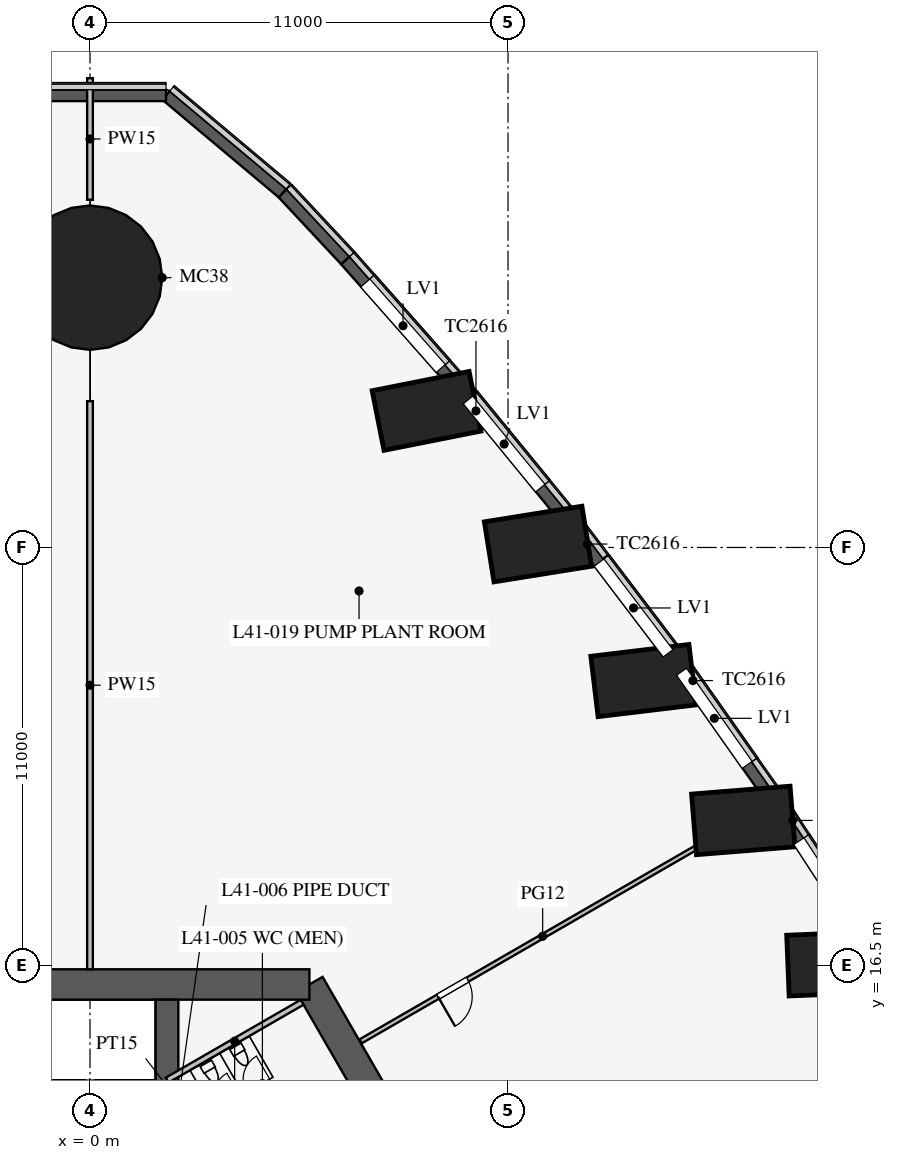
"""IFC4 building model, lengths in metres.
Left out: names, types, materials, properties, quantities, classifications, styles, units other than length and angle.
Written with IfcOpenShell. Run it as: python <this file> out.ifc"""

import sys

from ifc_helpers import new_model, si_unit, direction, frame, frame_2d, origin, origin_2d, place, context, subcontext, project, spatial, polyline, rectangle, circle, outline, extrude, clip, halfspace, element, fill, save


model = new_model("IFC4")
c1 = context("Model", 3, precision=1e-05, world=origin(), true_north=direction((0.0, 1.0)))
c2 = subcontext(c1, "Body", "Model", "MODEL_VIEW")
j1 = project(units=[si_unit("LENGTHUNIT", "METRE"), si_unit("PLANEANGLEUNIT", "RADIAN")], contexts=[c1])
p1 = place(None, origin())
s1 = spatial("IfcSite", under=j1, at=p1, CompositionType="ELEMENT")
p2 = place(p1, origin())
s2 = spatial("IfcBuilding", under=s1, at=p2, CompositionType="ELEMENT")
p3 = place(p2, frame((0.0, 0.0, 178.7)))
s3 = spatial("IfcBuildingStorey", under=s2, at=p3, CompositionType="ELEMENT", Elevation=178.7)
p4 = place(p3, frame((19.893, 16.681, 0.0), z_axis=(-0.186289343802, -0.107569380049, 0.976588505391), x_axis=(-0.533517685828, 0.845745042504, -0.008614057662)))
e1 = element("IfcColumn", 1, at=p4, inside=s3, PredefinedType="COLUMN", context=c2, shape_type="Clipping", body=[
    clip(clip(extrude(rectangle(XDim=2.6, YDim=1.6, at=origin_2d()), origin(), (0.0, 0.0, 1.0), 6.144), halfspace(frame((0.0, 0.0, 0.188), z_axis=(1.3253644547951e-05, 2.4571096812753272e-06, 0.9999999999091518), x_axis=(0.0, 0.9999999999969813, -2.457109681491134e-06)), True)), halfspace(frame((0.0, 0.0, 5.955), z_axis=(-1.3253644547951e-05, -2.4571096812753272e-06, -0.9999999999091518), x_axis=(0.0, -0.9999999999969813, 2.457109681491134e-06)), True)),
])
p5 = place(p3, frame((17.43, 20.456, 0.0), z_axis=(-0.195428167391, -0.112817153021, 0.974207432416), x_axis=(-0.565774582808, 0.824362784845, -0.018031095686)))
e2 = element("IfcColumn", 2, at=p5, inside=s3, PredefinedType="COLUMN", context=c2, shape_type="Clipping", body=[
    clip(clip(extrude(rectangle(XDim=2.6, YDim=1.6, at=origin_2d()), origin(), (0.0, 0.0, 1.0), 6.159), halfspace(frame((0.0, 0.0, 0.21), z_axis=(-1.0393805708591025e-05, 1.5065167287081627e-05, 0.9999999998325048), x_axis=(0.0, 0.9999999998865204, -1.5065167287895381e-05)), True)), halfspace(frame((0.0, 0.0, 5.949), z_axis=(1.0393805708591025e-05, -1.5065167287081627e-05, -0.9999999998325048), x_axis=(0.0, -0.9999999998865204, 1.5065167287895381e-05)), True)),
])
p6 = place(p3, frame((14.825, 24.148, 0.0), z_axis=(-0.21067852764, -0.121639419668, 0.969957942168), x_axis=(-0.596714603171, 0.801927852563, -0.029041378179)))
e3 = element("IfcColumn", 3, at=p6, inside=s3, PredefinedType="COLUMN", context=c2, shape_type="Clipping", body=[
    clip(clip(extrude(rectangle(XDim=2.6, YDim=1.6, at=origin_2d()), origin(), (0.0, 0.0, 1.0), 6.186), halfspace(frame((0.0, 0.0, 0.239), z_axis=(1.2329942088509793e-06, -1.9590941299552078e-05, 0.9999999998073374), x_axis=(0.0, 0.9999999998080975, 1.959094129956697e-05)), True)), halfspace(frame((0.0, 0.0, 5.947), z_axis=(-1.2329942088509793e-06, 1.9590941299552078e-05, -0.9999999998073374), x_axis=(0.0, -0.9999999998080975, -1.959094129956697e-05)), True)),
])
p7 = place(p3, frame((12.077, 27.757, 0.0), z_axis=(-0.231966146532, -0.13391860006, 0.963461216355), x_axis=(-0.625685218316, 0.778923924192, -0.042373669911)))
e4 = element("IfcColumn", 4, at=p7, inside=s3, PredefinedType="COLUMN", context=c2, shape_type="Clipping", body=[
    clip(clip(extrude(rectangle(XDim=2.6, YDim=1.6, at=origin_2d()), origin(), (0.0, 0.0, 1.0), 6.228), halfspace(frame((0.0, 0.0, 0.278), z_axis=(-5.254736092627499e-06, 6.1632004548783925e-06, 0.9999999999672015), x_axis=(0.0, 0.9999999999810075, -6.163200454963482e-06)), True)), halfspace(frame((0.0, 0.0, 5.95), z_axis=(5.254736092627499e-06, -6.1632004548783925e-06, -0.9999999999672015), x_axis=(0.0, -0.9999999999810075, 6.163200454963482e-06)), True)),
])
p8 = place(p3, frame((9.182, 31.282, 0.0), z_axis=(-0.259194268696, -0.149669548506, 0.954157931018), x_axis=(-0.651400622005, 0.756491765533, -0.058287548681)))
e5 = element("IfcColumn", 5, at=p8, inside=s3, PredefinedType="COLUMN", context=c2, shape_type="Clipping", body=[
    clip(clip(extrude(rectangle(XDim=2.6, YDim=1.6, at=origin_2d()), origin(), (0.0, 0.0, 1.0), 6.288), halfspace(frame((0.0, 0.0, 0.327), z_axis=(1.865964990373226e-05, -1.1263139130357482e-05, 0.9999999997624797), x_axis=(0.0, 0.9999999999365708, 1.1263139132318295e-05)), True)), halfspace(frame((0.0, 0.0, 5.962), z_axis=(-1.865964990373226e-05, 1.1263139130357482e-05, -0.9999999997624797), x_axis=(0.0, -0.9999999999365708, -1.1263139132318295e-05)), True)),
])
p9 = place(p3, frame((0.0, 35.0, 0.0), z_axis=(0.0, -0.316227766017, 0.948683298051), x_axis=(1.0, 0.0, 0.0)))
e6 = element("IfcColumn", 6, at=p9, inside=s3, PredefinedType="COLUMN", context=c2, shape_type="Clipping", body=[
    clip(clip(extrude(circle(Radius=1.9, at=origin_2d()), origin(), (0.0, 0.0, 1.0), 6.324), halfspace(frame((0.0, 0.0, 0.634), z_axis=(0.0, 0.0, 1.0), x_axis=(0.0, 1.0, 0.0)), True)), halfspace(frame((0.0, 0.0, 5.69), z_axis=(0.0, 0.0, -1.0), x_axis=(0.0, -1.0, 0.0)), True)),
])
p10 = place(p3, frame((16.743, -3.0, 0.0), z_axis=(0.0, 0.0, 1.0), x_axis=(-0.500002442456, 0.866023993627, 0.0)))
e7 = element("IfcWall", 7, at=p10, inside=s3, PredefinedType="SHEAR", context=c2, shape_type="SweptSolid", body=[
    extrude(rectangle(XDim=21.939, YDim=0.8, at=frame_2d((10.97, 0.0))), origin(), (0.0, 0.0, 1.0), 6.0),
])
p11 = place(p10, frame((17.27, 0.0, 0.0)))
e8 = element("IfcOpeningElement", 8, at=p11, cuts=e7, PredefinedType="OPENING", context=c2, shape_type="SweptSolid", body=[
    extrude(rectangle(XDim=1.2, YDim=2.1, at=frame_2d((0.6, 1.05))), frame((0.0, 0.41, 0.0), z_axis=(0.0, -1.0, 0.0), x_axis=(1.0, 0.0, 0.0)), (0.0, 0.0, 1.0), 0.82),
])
p12 = place(p10, frame((3.47, 0.0, 0.0)))
e9 = element("IfcOpeningElement", 9, at=p12, cuts=e7, PredefinedType="OPENING", context=c2, shape_type="SweptSolid", body=[
    extrude(rectangle(XDim=1.2, YDim=2.1, at=frame_2d((0.6, 1.05))), frame((0.0, 0.41, 0.0), z_axis=(0.0, -1.0, 0.0), x_axis=(1.0, 0.0, 0.0)), (0.0, 0.0, 1.0), 0.82),
])
p13 = place(p3, frame((5.773, 16.0, 0.0), z_axis=(0.0, 0.0, 1.0), x_axis=(-1.0, 0.0, 0.0)))
e10 = element("IfcWall", 10, at=p13, inside=s3, PredefinedType="SHEAR", context=c2, shape_type="SweptSolid", body=[
    extrude(rectangle(XDim=11.547, YDim=0.8, at=frame_2d((5.773, 0.0))), origin(), (0.0, 0.0, 1.0), 6.0),
])
p14 = place(p3, frame((2.025, 6.525, 0.0), z_axis=(0.0, 0.0, 1.0), x_axis=(0.0, 1.0, 0.0)))
e11 = element("IfcWall", 11, at=p14, inside=s3, PredefinedType="SHEAR", context=c2, shape_type="SweptSolid", body=[
    extrude(rectangle(XDim=9.075, YDim=0.6, at=frame_2d((4.538, 0.0))), origin(), (0.0, 0.0, 1.0), 6.0),
])
p15 = place(p3, frame((20.456, 17.006, 0.0), z_axis=(0.0, 0.0, 1.0), x_axis=(-0.546107481908, 0.83771511757, 0.0)))
e12 = element("IfcWall", 12, at=p15, inside=s3, PredefinedType="SOLIDWALL", context=c2, shape_type="SweptSolid", body=[
    extrude(rectangle(XDim=4.507, YDim=0.3, at=frame_2d((2.253, 0.0))), origin(), (0.0, 0.0, 1.0), 5.8),
])
p16 = place(p15, frame((0.3, 0.0, 3.5)))
e13 = element("IfcOpeningElement", 13, at=p16, cuts=e12, PredefinedType="OPENING", context=c2, shape_type="SweptSolid", body=[
    extrude(rectangle(XDim=3.0, YDim=2.0, at=frame_2d((1.5, 1.0))), frame((0.0, 0.16, 0.0), z_axis=(0.0, -1.0, 0.0), x_axis=(1.0, 0.0, 0.0)), (0.0, 0.0, 1.0), 0.32),
])
p17 = place(p3, frame((17.995, 20.782, 0.0), z_axis=(0.0, 0.0, 1.0), x_axis=(-0.575987178736, 0.817458726745, 0.0)))
e14 = element("IfcWall", 14, at=p17, inside=s3, PredefinedType="SOLIDWALL", context=c2, shape_type="SweptSolid", body=[
    extrude(rectangle(XDim=4.518, YDim=0.3, at=frame_2d((2.259, 0.0))), origin(), (0.0, 0.0, 1.0), 5.8),
])
p18 = place(p17, frame((1.218, 0.0, 3.5)))
e15 = element("IfcOpeningElement", 15, at=p18, cuts=e14, PredefinedType="OPENING", context=c2, shape_type="SweptSolid", body=[
    extrude(rectangle(XDim=3.0, YDim=2.0, at=frame_2d((1.5, 1.0))), frame((0.0, 0.16, 0.0), z_axis=(0.0, -1.0, 0.0), x_axis=(1.0, 0.0, 0.0)), (0.0, 0.0, 1.0), 0.32),
])
p19 = place(p3, frame((15.392, 24.475, 0.0), z_axis=(0.0, 0.0, 1.0), x_axis=(-0.605274299339, 0.796016973789, 0.0)))
e16 = element("IfcWall", 16, at=p19, inside=s3, PredefinedType="SOLIDWALL", context=c2, shape_type="SweptSolid", body=[
    extrude(rectangle(XDim=4.536, YDim=0.3, at=frame_2d((2.268, 0.0))), origin(), (0.0, 0.0, 1.0), 5.8),
])
p20 = place(p19, frame((0.3, 0.0, 3.5)))
e17 = element("IfcOpeningElement", 17, at=p20, cuts=e16, PredefinedType="OPENING", context=c2, shape_type="SweptSolid", body=[
    extrude(rectangle(XDim=3.0, YDim=2.0, at=frame_2d((1.5, 1.0))), frame((0.0, 0.16, 0.0), z_axis=(0.0, -1.0, 0.0), x_axis=(1.0, 0.0, 0.0)), (0.0, 0.0, 1.0), 0.32),
])
p21 = place(p3, frame((12.647, 28.086, 0.0), z_axis=(0.0, 0.0, 1.0), x_axis=(-0.633811934582, 0.773487189022, 0.0)))
e18 = element("IfcWall", 18, at=p21, inside=s3, PredefinedType="SOLIDWALL", context=c2, shape_type="SweptSolid", body=[
    extrude(rectangle(XDim=4.56, YDim=0.3, at=frame_2d((2.28, 0.0))), origin(), (0.0, 0.0, 1.0), 5.8),
])
p22 = place(p21, frame((1.26, 0.0, 3.5)))
e19 = element("IfcOpeningElement", 19, at=p22, cuts=e18, PredefinedType="OPENING", context=c2, shape_type="SweptSolid", body=[
    extrude(rectangle(XDim=3.0, YDim=2.0, at=frame_2d((1.5, 1.0))), frame((0.0, 0.16, 0.0), z_axis=(0.0, -1.0, 0.0), x_axis=(1.0, 0.0, 0.0)), (0.0, 0.0, 1.0), 0.32),
])
p23 = place(p3, frame((9.756, 31.614, 0.0), z_axis=(0.0, 0.0, 1.0), x_axis=(-0.66176232182, 0.7497136983, 0.0)))
e20 = element("IfcWall", 20, at=p23, inside=s3, PredefinedType="SOLIDWALL", context=c2, shape_type="SweptSolid", body=[
    extrude(rectangle(XDim=4.591, YDim=0.3, at=frame_2d((2.296, 0.0))), origin(), (0.0, 0.0, 1.0), 5.8),
])
p24 = place(p23, frame((0.796, 0.0, 3.5)))
e21 = element("IfcOpeningElement", 21, at=p24, cuts=e20, PredefinedType="OPENING", context=c2, shape_type="SweptSolid", body=[
    extrude(rectangle(XDim=3.0, YDim=2.0, at=frame_2d((1.5, 1.0))), frame((0.0, 0.16, 0.0), z_axis=(0.0, -1.0, 0.0), x_axis=(1.0, 0.0, 0.0)), (0.0, 0.0, 1.0), 0.32),
])
p25 = place(p3, frame((6.718, 35.056, 0.0), z_axis=(0.0, 0.0, 1.0), x_axis=(-0.682533872246, 0.730853961635, 0.0)))
e22 = element("IfcWall", 22, at=p25, inside=s3, PredefinedType="SOLIDWALL", context=c2, shape_type="SweptSolid", body=[
    extrude(rectangle(XDim=2.42, YDim=0.3, at=frame_2d((1.21, 0.0))), origin(), (0.0, 0.0, 1.0), 5.8),
])
for number, where, z_axis, x_axis in (
    (23, (5.066, 36.824, 0.0), (0.0, 0.0, 1.0), (-0.766, 0.643, 0.0)),
    (24, (2.001, 39.396, 0.0), (0.0, 0.0, 1.0), (-1.0, 0.0, 0.0)),
):
    element("IfcWall", number, at=place(p3, frame(where, z_axis=z_axis, x_axis=x_axis)), inside=s3, PredefinedType="SOLIDWALL", context=c2, shape_type="SweptSolid", body=[
        extrude(rectangle(XDim=4.001, YDim=0.3, at=frame_2d((2.001, 0.0))), origin(), (0.0, 0.0, 1.0), 5.8),
    ])
p26 = place(p3, frame((2.031, 13.482, 0.0), z_axis=(0.0, 0.0, 1.0), x_axis=(0.866050731258, 0.499956128963, 0.0)))
e25 = element("IfcWall", 25, at=p26, inside=s3, PredefinedType="PARTITIONING", context=c2, shape_type="SweptSolid", body=[
    extrude(rectangle(XDim=4.1, YDim=0.15, at=frame_2d((2.05, 0.0))), origin(), (0.0, 0.0, 1.0), 5.8),
])
p27 = place(p3, frame((0.0, 16.4, 0.0), z_axis=(0.0, 0.0, 1.0), x_axis=(0.0, 1.0, 0.0)))
e26 = element("IfcWall", 26, at=p27, inside=s3, PredefinedType="PARTITIONING", context=c2, shape_type="SweptSolid", body=[
    extrude(rectangle(XDim=14.95, YDim=0.15, at=frame_2d((7.475, 0.0))), origin(), (0.0, 0.0, 1.0), 4.2),
])
p28 = place(p3, frame((0.0, 36.65, 0.0), z_axis=(0.0, 0.0, 1.0), x_axis=(0.0, 1.0, 0.0)))
e27 = element("IfcWall", 27, at=p28, inside=s3, PredefinedType="PARTITIONING", context=c2, shape_type="SweptSolid", body=[
    extrude(rectangle(XDim=3.199, YDim=0.15, at=frame_2d((1.6, 0.0))), origin(), (0.0, 0.0, 1.0), 5.8),
])
p29 = place(p3, frame((16.122, 19.7, 0.0), z_axis=(0.0, 0.0, 1.0), x_axis=(0.866002566612, 0.500039553057, 0.0)))
e28 = element("IfcWall", 28, at=p29, inside=s3, PredefinedType="PARTITIONING", context=c2, shape_type="SweptSolid", body=[
    extrude(outline(polyline([(0.0, 0.0), (0.667, 0.0), (0.667, 0.05), (0.0, 2.9), (0.0, 0.0)])), frame((0.0, 0.06, 0.0), z_axis=(0.0, -1.0, 0.0), x_axis=(1.0, 0.0, 0.0)), (0.0, 0.0, 1.0), 0.12),
])
p30 = place(p3, frame((7.122, 14.504, 0.0), z_axis=(0.0, 0.0, 1.0), x_axis=(0.866025583565, 0.49999968861, 0.0)))
e29 = element("IfcWall", 29, at=p30, inside=s3, PredefinedType="PARTITIONING", context=c2, shape_type="SweptSolid", body=[
    extrude(rectangle(XDim=10.393, YDim=0.12, at=frame_2d((5.196, 0.0))), origin(), (0.0, 0.0, 1.0), 2.9),
])
p31 = place(p30, frame((2.35, 0.0, 0.0)))
e30 = element("IfcOpeningElement", 30, at=p31, cuts=e29, PredefinedType="OPENING", context=c2, shape_type="SweptSolid", body=[
    extrude(rectangle(XDim=0.9, YDim=2.1, at=frame_2d((0.45, 1.05))), frame((0.0, 0.07, 0.0), z_axis=(0.0, -1.0, 0.0), x_axis=(1.0, 0.0, 0.0)), (0.0, 0.0, 1.0), 0.14),
])
p32 = place(p16, origin())
e31 = element("IfcWindow", 31, at=p32, inside=s3, PartitioningType="SINGLE_PANEL", PredefinedType="USERDEFINED", context=c2, shape_type="SweptSolid", body=[
    extrude(rectangle(XDim=3.0, YDim=2.0, at=frame_2d((1.5, 1.0))), frame((0.0, 0.03, 0.0), z_axis=(0.0, -1.0, 0.0), x_axis=(1.0, 0.0, 0.0)), (0.0, 0.0, 1.0), 0.06),
])
fill(e13, e31)
p33 = place(p18, origin())
e32 = element("IfcWindow", 32, at=p33, inside=s3, PartitioningType="SINGLE_PANEL", PredefinedType="USERDEFINED", context=c2, shape_type="SweptSolid", body=[
    extrude(rectangle(XDim=3.0, YDim=2.0, at=frame_2d((1.5, 1.0))), frame((0.0, 0.03, 0.0), z_axis=(0.0, -1.0, 0.0), x_axis=(1.0, 0.0, 0.0)), (0.0, 0.0, 1.0), 0.06),
])
fill(e15, e32)
p34 = place(p20, origin())
e33 = element("IfcWindow", 33, at=p34, inside=s3, PartitioningType="SINGLE_PANEL", PredefinedType="USERDEFINED", context=c2, shape_type="SweptSolid", body=[
    extrude(rectangle(XDim=3.0, YDim=2.0, at=frame_2d((1.5, 1.0))), frame((0.0, 0.03, 0.0), z_axis=(0.0, -1.0, 0.0), x_axis=(1.0, 0.0, 0.0)), (0.0, 0.0, 1.0), 0.06),
])
fill(e17, e33)
p35 = place(p22, origin())
e34 = element("IfcWindow", 34, at=p35, inside=s3, PartitioningType="SINGLE_PANEL", PredefinedType="USERDEFINED", context=c2, shape_type="SweptSolid", body=[
    extrude(rectangle(XDim=3.0, YDim=2.0, at=frame_2d((1.5, 1.0))), frame((0.0, 0.03, 0.0), z_axis=(0.0, -1.0, 0.0), x_axis=(1.0, 0.0, 0.0)), (0.0, 0.0, 1.0), 0.06),
])
fill(e19, e34)
p36 = place(p24, origin())
e35 = element("IfcWindow", 35, at=p36, inside=s3, PartitioningType="SINGLE_PANEL", PredefinedType="USERDEFINED", context=c2, shape_type="SweptSolid", body=[
    extrude(rectangle(XDim=3.0, YDim=2.0, at=frame_2d((1.5, 1.0))), frame((0.0, 0.03, 0.0), z_axis=(0.0, -1.0, 0.0), x_axis=(1.0, 0.0, 0.0)), (0.0, 0.0, 1.0), 0.06),
])
fill(e21, e35)
p37 = place(p31, frame((0.9, 0.0, 0.0), z_axis=(0.0, 0.0, 1.0), x_axis=(-1.0, 0.0, 0.0)))
e36 = element("IfcDoor", 36, at=p37, inside=s3, OperationType="SINGLE_SWING_RIGHT", PredefinedType="DOOR", context=c2, shape_type="SweptSolid", body=[
    extrude(rectangle(XDim=0.9, YDim=2.1, at=frame_2d((0.45, 1.05))), frame((0.0, 0.025, 0.0), z_axis=(0.0, -1.0, 0.0), x_axis=(1.0, 0.0, 0.0)), (0.0, 0.0, 1.0), 0.05),
])
fill(e30, e36)
save(model, sys.argv[1])
